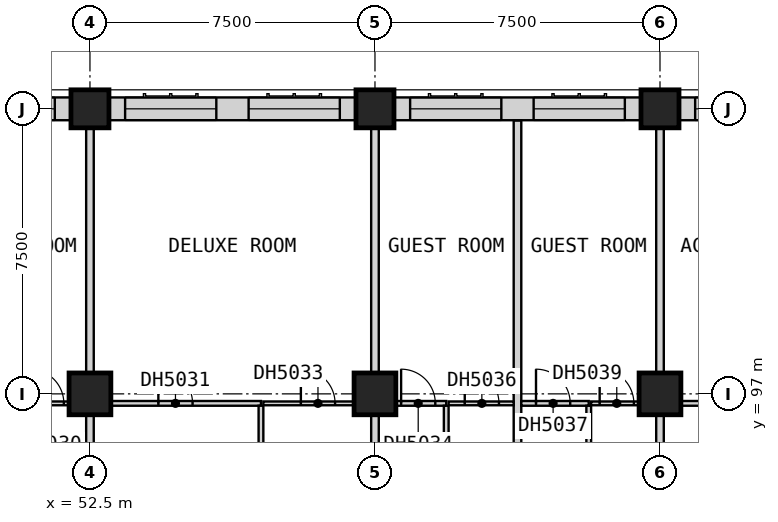
"""IFC4 building model, lengths in metres.
Left out: names, types, materials, properties, quantities, classifications, styles, units other than length and angle.
Written with IfcOpenShell. Run it as: python <this file> out.ifc"""

import sys

from ifc_helpers import new_model, si_unit, direction, frame, frame_2d, origin, origin_2d, place, context, subcontext, project, spatial, rectangle, extrude, element, fill, save


model = new_model("IFC4")
c1 = context("Model", 3, precision=1e-05, world=origin(), true_north=direction((0.0, 1.0)))
c2 = subcontext(c1, "Body", "Model", "MODEL_VIEW")
j1 = project(units=[si_unit("LENGTHUNIT", "METRE"), si_unit("PLANEANGLEUNIT", "RADIAN")], contexts=[c1])
p1 = place(None, origin())
s1 = spatial("IfcSite", under=j1, at=p1, CompositionType="ELEMENT")
p2 = place(p1, origin())
s2 = spatial("IfcBuilding", under=s1, at=p2, CompositionType="ELEMENT")
p3 = place(p2, frame((0.0, 0.0, 93.5)))
s3 = spatial("IfcBuildingStorey", under=s2, at=p3, CompositionType="ELEMENT", Elevation=93.5)
p4 = place(p3, frame((52.5, 97.0, 0.0), z_axis=(0.0, 0.0, 1.0), x_axis=(1.0, 0.0, 0.0)))
e1 = element("IfcColumn", 1, at=p4, inside=s3, PredefinedType="COLUMN", context=c2, shape_type="SweptSolid", body=[
    extrude(rectangle(XDim=1.1, YDim=1.1, at=origin_2d()), origin(), (0.0, 0.0, 1.0), 3.6),
])
p5 = place(p3, frame((52.5, 104.5, 0.0), z_axis=(0.0, 0.0, 1.0), x_axis=(1.0, 0.0, 0.0)))
e2 = element("IfcColumn", 2, at=p5, inside=s3, PredefinedType="COLUMN", context=c2, shape_type="SweptSolid", body=[
    extrude(rectangle(XDim=1.0, YDim=1.0, at=origin_2d()), origin(), (0.0, 0.0, 1.0), 3.6),
])
p6 = place(p3, frame((60.0, 97.0, 0.0), z_axis=(0.0, 0.0, 1.0), x_axis=(1.0, 0.0, 0.0)))
e3 = element("IfcColumn", 3, at=p6, inside=s3, PredefinedType="COLUMN", context=c2, shape_type="SweptSolid", body=[
    extrude(rectangle(XDim=1.1, YDim=1.1, at=origin_2d()), origin(), (0.0, 0.0, 1.0), 3.6),
])
p7 = place(p3, frame((60.0, 104.5, 0.0), z_axis=(0.0, 0.0, 1.0), x_axis=(1.0, 0.0, 0.0)))
e4 = element("IfcColumn", 4, at=p7, inside=s3, PredefinedType="COLUMN", context=c2, shape_type="SweptSolid", body=[
    extrude(rectangle(XDim=1.0, YDim=1.0, at=origin_2d()), origin(), (0.0, 0.0, 1.0), 3.6),
])
p8 = place(p3, frame((67.5, 97.0, 0.0), z_axis=(0.0, 0.0, 1.0), x_axis=(1.0, 0.0, 0.0)))
e5 = element("IfcColumn", 5, at=p8, inside=s3, PredefinedType="COLUMN", context=c2, shape_type="SweptSolid", body=[
    extrude(rectangle(XDim=1.1, YDim=1.1, at=origin_2d()), origin(), (0.0, 0.0, 1.0), 3.6),
])
p9 = place(p3, frame((67.5, 104.5, 0.0), z_axis=(0.0, 0.0, 1.0), x_axis=(1.0, 0.0, 0.0)))
e6 = element("IfcColumn", 6, at=p9, inside=s3, PredefinedType="COLUMN", context=c2, shape_type="SweptSolid", body=[
    extrude(rectangle(XDim=1.0, YDim=1.0, at=origin_2d()), origin(), (0.0, 0.0, 1.0), 3.6),
])
p10 = place(p3, frame((74.0, 104.5, 0.0), z_axis=(0.0, 0.0, 1.0), x_axis=(-1.0, 0.0, 0.0)))
e7 = element("IfcWall", 7, at=p10, inside=s3, PredefinedType="SOLIDWALL", context=c2, shape_type="SweptSolid", body=[
    extrude(rectangle(XDim=6.0, YDim=0.6, at=frame_2d((3.0, 0.0))), origin(), (0.0, 0.0, 1.0), 2.85),
])
p11 = place(p10, frame((3.175, 0.0, 0.8)))
e8 = element("IfcOpeningElement", 8, at=p11, cuts=e7, PredefinedType="OPENING", context=c2, shape_type="SweptSolid", body=[
    extrude(rectangle(XDim=2.4, YDim=1.8, at=frame_2d((1.2, 0.9))), frame((0.0, 0.31, 0.0), z_axis=(0.0, -1.0, 0.0), x_axis=(1.0, 0.0, 0.0)), (0.0, 0.0, 1.0), 0.62),
])
p12 = place(p10, frame((0.175, 0.0, 0.8)))
e9 = element("IfcOpeningElement", 9, at=p12, cuts=e7, PredefinedType="OPENING", context=c2, shape_type="SweptSolid", body=[
    extrude(rectangle(XDim=2.4, YDim=1.8, at=frame_2d((1.2, 0.9))), frame((0.0, 0.31, 0.0), z_axis=(0.0, -1.0, 0.0), x_axis=(1.0, 0.0, 0.0)), (0.0, 0.0, 1.0), 0.62),
])
p13 = place(p3, frame((67.0, 104.5, 0.0), z_axis=(0.0, 0.0, 1.0), x_axis=(-1.0, 0.0, 0.0)))
e10 = element("IfcWall", 10, at=p13, inside=s3, PredefinedType="SOLIDWALL", context=c2, shape_type="SweptSolid", body=[
    extrude(rectangle(XDim=6.5, YDim=0.6, at=frame_2d((3.25, 0.0))), origin(), (0.0, 0.0, 1.0), 2.85),
])
p14 = place(p13, frame((3.675, 0.0, 0.8)))
e11 = element("IfcOpeningElement", 11, at=p14, cuts=e10, PredefinedType="OPENING", context=c2, shape_type="SweptSolid", body=[
    extrude(rectangle(XDim=2.4, YDim=1.8, at=frame_2d((1.2, 0.9))), frame((0.0, 0.31, 0.0), z_axis=(0.0, -1.0, 0.0), x_axis=(1.0, 0.0, 0.0)), (0.0, 0.0, 1.0), 0.62),
])
p15 = place(p13, frame((0.425, 0.0, 0.8)))
e12 = element("IfcOpeningElement", 12, at=p15, cuts=e10, PredefinedType="OPENING", context=c2, shape_type="SweptSolid", body=[
    extrude(rectangle(XDim=2.4, YDim=1.8, at=frame_2d((1.2, 0.9))), frame((0.0, 0.31, 0.0), z_axis=(0.0, -1.0, 0.0), x_axis=(1.0, 0.0, 0.0)), (0.0, 0.0, 1.0), 0.62),
])
p16 = place(p3, frame((59.5, 104.5, 0.0), z_axis=(0.0, 0.0, 1.0), x_axis=(-1.0, 0.0, 0.0)))
e13 = element("IfcWall", 13, at=p16, inside=s3, PredefinedType="SOLIDWALL", context=c2, shape_type="SweptSolid", body=[
    extrude(rectangle(XDim=6.5, YDim=0.6, at=frame_2d((3.25, 0.0))), origin(), (0.0, 0.0, 1.0), 2.85),
])
p17 = place(p16, frame((3.675, 0.0, 0.8)))
e14 = element("IfcOpeningElement", 14, at=p17, cuts=e13, PredefinedType="OPENING", context=c2, shape_type="SweptSolid", body=[
    extrude(rectangle(XDim=2.4, YDim=1.8, at=frame_2d((1.2, 0.9))), frame((0.0, 0.31, 0.0), z_axis=(0.0, -1.0, 0.0), x_axis=(1.0, 0.0, 0.0)), (0.0, 0.0, 1.0), 0.62),
])
p18 = place(p16, frame((0.425, 0.0, 0.8)))
e15 = element("IfcOpeningElement", 15, at=p18, cuts=e13, PredefinedType="OPENING", context=c2, shape_type="SweptSolid", body=[
    extrude(rectangle(XDim=2.4, YDim=1.8, at=frame_2d((1.2, 0.9))), frame((0.0, 0.31, 0.0), z_axis=(0.0, -1.0, 0.0), x_axis=(1.0, 0.0, 0.0)), (0.0, 0.0, 1.0), 0.62),
])
p19 = place(p3, frame((52.0, 104.5, 0.0), z_axis=(0.0, 0.0, 1.0), x_axis=(-1.0, 0.0, 0.0)))
e16 = element("IfcWall", 16, at=p19, inside=s3, PredefinedType="SOLIDWALL", context=c2, shape_type="SweptSolid", body=[
    extrude(rectangle(XDim=6.5, YDim=0.6, at=frame_2d((3.25, 0.0))), origin(), (0.0, 0.0, 1.0), 2.85),
])
p20 = place(p19, frame((3.675, 0.0, 0.8)))
e17 = element("IfcOpeningElement", 17, at=p20, cuts=e16, PredefinedType="OPENING", context=c2, shape_type="SweptSolid", body=[
    extrude(rectangle(XDim=2.4, YDim=1.8, at=frame_2d((1.2, 0.9))), frame((0.0, 0.31, 0.0), z_axis=(0.0, -1.0, 0.0), x_axis=(1.0, 0.0, 0.0)), (0.0, 0.0, 1.0), 0.62),
])
p21 = place(p19, frame((0.425, 0.0, 0.8)))
e18 = element("IfcOpeningElement", 18, at=p21, cuts=e16, PredefinedType="OPENING", context=c2, shape_type="SweptSolid", body=[
    extrude(rectangle(XDim=2.4, YDim=1.8, at=frame_2d((1.2, 0.9))), frame((0.0, 0.31, 0.0), z_axis=(0.0, -1.0, 0.0), x_axis=(1.0, 0.0, 0.0)), (0.0, 0.0, 1.0), 0.62),
])
for number, where, z_axis, x_axis in (
    (19, (52.5, 92.475, 0.0), (0.0, 0.0, 1.0), (0.0, 1.0, 0.0)),
    (20, (60.0, 92.475, 0.0), (0.0, 0.0, 1.0), (0.0, 1.0, 0.0)),
):
    element("IfcWall", number, at=place(p3, frame(where, z_axis=z_axis, x_axis=x_axis)), inside=s3, PredefinedType="PARTITIONING", context=c2, shape_type="SweptSolid", body=[
        extrude(rectangle(XDim=12.525, YDim=0.2, at=frame_2d((6.262, 0.0))), origin(), (0.0, 0.0, 1.0), 3.35),
    ])
p22 = place(p3, frame((63.75, 92.475, 0.0), z_axis=(0.0, 0.0, 1.0), x_axis=(0.0, 1.0, 0.0)))
e21 = element("IfcWall", 21, at=p22, inside=s3, PredefinedType="PARTITIONING", context=c2, shape_type="SweptSolid", body=[
    extrude(rectangle(XDim=11.715, YDim=0.2, at=frame_2d((5.857, 0.0))), origin(), (0.0, 0.0, 1.0), 3.35),
])
p23 = place(p3, frame((67.5, 92.475, 0.0), z_axis=(0.0, 0.0, 1.0), x_axis=(0.0, 1.0, 0.0)))
e22 = element("IfcWall", 22, at=p23, inside=s3, PredefinedType="PARTITIONING", context=c2, shape_type="SweptSolid", body=[
    extrude(rectangle(XDim=12.525, YDim=0.2, at=frame_2d((6.262, 0.0))), origin(), (0.0, 0.0, 1.0), 3.35),
])
p24 = place(p3, frame((50.688, 96.75, 0.0), z_axis=(0.0, 0.0, 1.0), x_axis=(1.0, 0.0, 0.0)))
e23 = element("IfcWall", 23, at=p24, inside=s3, PredefinedType="PARTITIONING", context=c2, shape_type="SweptSolid", body=[
    extrude(rectangle(XDim=1.712, YDim=0.1, at=frame_2d((0.856, 0.0))), origin(), (0.0, 0.0, 1.0), 3.35),
])
p25 = place(p24, frame((0.225, 0.0, 0.0)))
e24 = element("IfcOpeningElement", 24, at=p25, cuts=e23, PredefinedType="OPENING", context=c2, shape_type="SweptSolid", body=[
    extrude(rectangle(XDim=0.9, YDim=2.1, at=frame_2d((0.45, 1.05))), frame((0.0, 0.06, 0.0), z_axis=(0.0, -1.0, 0.0), x_axis=(1.0, 0.0, 0.0)), (0.0, 0.0, 1.0), 0.12),
])
p26 = place(p3, frame((57.062, 96.75, 0.0), z_axis=(0.0, 0.0, 1.0), x_axis=(1.0, 0.0, 0.0)))
e25 = element("IfcWall", 25, at=p26, inside=s3, PredefinedType="PARTITIONING", context=c2, shape_type="SweptSolid", body=[
    extrude(rectangle(XDim=2.837, YDim=0.1, at=frame_2d((1.419, 0.0))), origin(), (0.0, 0.0, 1.0), 3.35),
])
p27 = place(p26, frame((0.988, 0.0, 0.0)))
e26 = element("IfcOpeningElement", 26, at=p27, cuts=e25, PredefinedType="OPENING", context=c2, shape_type="SweptSolid", body=[
    extrude(rectangle(XDim=0.9, YDim=2.1, at=frame_2d((0.45, 1.05))), frame((0.0, 0.06, 0.0), z_axis=(0.0, -1.0, 0.0), x_axis=(1.0, 0.0, 0.0)), (0.0, 0.0, 1.0), 0.12),
])
p28 = place(p3, frame((61.938, 96.75, 0.0), z_axis=(0.0, 0.0, 1.0), x_axis=(1.0, 0.0, 0.0)))
e27 = element("IfcWall", 27, at=p28, inside=s3, PredefinedType="PARTITIONING", context=c2, shape_type="SweptSolid", body=[
    extrude(rectangle(XDim=1.712, YDim=0.1, at=frame_2d((0.856, 0.0))), origin(), (0.0, 0.0, 1.0), 3.35),
])
p29 = place(p28, frame((0.425, 0.0, 0.0)))
e28 = element("IfcOpeningElement", 28, at=p29, cuts=e27, PredefinedType="OPENING", context=c2, shape_type="SweptSolid", body=[
    extrude(rectangle(XDim=0.9, YDim=2.1, at=frame_2d((0.45, 1.05))), frame((0.0, 0.06, 0.0), z_axis=(0.0, -1.0, 0.0), x_axis=(1.0, 0.0, 0.0)), (0.0, 0.0, 1.0), 0.12),
])
p30 = place(p3, frame((65.688, 96.75, 0.0), z_axis=(0.0, 0.0, 1.0), x_axis=(1.0, 0.0, 0.0)))
e29 = element("IfcWall", 29, at=p30, inside=s3, PredefinedType="PARTITIONING", context=c2, shape_type="SweptSolid", body=[
    extrude(rectangle(XDim=1.712, YDim=0.1, at=frame_2d((0.856, 0.0))), origin(), (0.0, 0.0, 1.0), 3.35),
])
p31 = place(p30, frame((0.225, 0.0, 0.0)))
e30 = element("IfcOpeningElement", 30, at=p31, cuts=e29, PredefinedType="OPENING", context=c2, shape_type="SweptSolid", body=[
    extrude(rectangle(XDim=0.9, YDim=2.1, at=frame_2d((0.45, 1.05))), frame((0.0, 0.06, 0.0), z_axis=(0.0, -1.0, 0.0), x_axis=(1.0, 0.0, 0.0)), (0.0, 0.0, 1.0), 0.12),
])
p32 = place(p3, frame((52.6, 96.75, 0.0), z_axis=(0.0, 0.0, 1.0), x_axis=(1.0, 0.0, 0.0)))
e31 = element("IfcWall", 31, at=p32, inside=s3, PredefinedType="PARTITIONING", context=c2, shape_type="SweptSolid", body=[
    extrude(rectangle(XDim=4.4, YDim=0.125, at=frame_2d((2.2, 0.0))), origin(), (0.0, 0.0, 1.0), 3.35),
])
p33 = place(p32, frame((1.7, 0.0, 0.0)))
e32 = element("IfcOpeningElement", 32, at=p33, cuts=e31, PredefinedType="OPENING", context=c2, shape_type="SweptSolid", body=[
    extrude(rectangle(XDim=0.9, YDim=2.1, at=frame_2d((0.45, 1.05))), frame((0.0, 0.073, 0.0), z_axis=(0.0, -1.0, 0.0), x_axis=(1.0, 0.0, 0.0)), (0.0, 0.0, 1.0), 0.145),
])
p34 = place(p3, frame((60.1, 96.75, 0.0), z_axis=(0.0, 0.0, 1.0), x_axis=(1.0, 0.0, 0.0)))
e33 = element("IfcWall", 33, at=p34, inside=s3, PredefinedType="PARTITIONING", context=c2, shape_type="SweptSolid", body=[
    extrude(rectangle(XDim=1.775, YDim=0.125, at=frame_2d((0.887, 0.0))), origin(), (0.0, 0.0, 1.0), 3.35),
])
p35 = place(p34, frame((0.587, 0.0, 0.0)))
e34 = element("IfcOpeningElement", 34, at=p35, cuts=e33, PredefinedType="OPENING", context=c2, shape_type="SweptSolid", body=[
    extrude(rectangle(XDim=0.9, YDim=2.1, at=frame_2d((0.45, 1.05))), frame((0.0, 0.073, 0.0), z_axis=(0.0, -1.0, 0.0), x_axis=(1.0, 0.0, 0.0)), (0.0, 0.0, 1.0), 0.145),
])
p36 = place(p3, frame((63.85, 96.75, 0.0), z_axis=(0.0, 0.0, 1.0), x_axis=(1.0, 0.0, 0.0)))
e35 = element("IfcWall", 35, at=p36, inside=s3, PredefinedType="PARTITIONING", context=c2, shape_type="SweptSolid", body=[
    extrude(rectangle(XDim=1.775, YDim=0.125, at=frame_2d((0.887, 0.0))), origin(), (0.0, 0.0, 1.0), 3.35),
])
p37 = place(p36, frame((0.387, 0.0, 0.0)))
e36 = element("IfcOpeningElement", 36, at=p37, cuts=e35, PredefinedType="OPENING", context=c2, shape_type="SweptSolid", body=[
    extrude(rectangle(XDim=0.9, YDim=2.1, at=frame_2d((0.45, 1.05))), frame((0.0, 0.073, 0.0), z_axis=(0.0, -1.0, 0.0), x_axis=(1.0, 0.0, 0.0)), (0.0, 0.0, 1.0), 0.145),
])
p38 = place(p3, frame((67.6, 96.75, 0.0), z_axis=(0.0, 0.0, 1.0), x_axis=(1.0, 0.0, 0.0)))
e37 = element("IfcWall", 37, at=p38, inside=s3, PredefinedType="PARTITIONING", context=c2, shape_type="SweptSolid", body=[
    extrude(rectangle(XDim=4.775, YDim=0.125, at=frame_2d((2.387, 0.0))), origin(), (0.0, 0.0, 1.0), 3.35),
])
p39 = place(p38, frame((1.837, 0.0, 0.0)))
e38 = element("IfcOpeningElement", 38, at=p39, cuts=e37, PredefinedType="OPENING", context=c2, shape_type="SweptSolid", body=[
    extrude(rectangle(XDim=1.0, YDim=2.1, at=frame_2d((0.5, 1.05))), frame((0.0, 0.073, 0.0), z_axis=(0.0, -1.0, 0.0), x_axis=(1.0, 0.0, 0.0)), (0.0, 0.0, 1.0), 0.145),
])
for number, where, z_axis, x_axis in (
    (39, (57.0, 92.475, 0.0), (0.0, 0.0, 1.0), (0.0, 1.0, 0.0)),
    (40, (61.875, 92.475, 0.0), (0.0, 0.0, 1.0), (0.0, 1.0, 0.0)),
    (41, (65.625, 92.475, 0.0), (0.0, 0.0, 1.0), (0.0, 1.0, 0.0)),
):
    element("IfcWall", number, at=place(p3, frame(where, z_axis=z_axis, x_axis=x_axis)), inside=s3, PredefinedType="PARTITIONING", context=c2, shape_type="SweptSolid", body=[
        extrude(rectangle(XDim=4.212, YDim=0.125, at=frame_2d((2.106, 0.0))), origin(), (0.0, 0.0, 1.0), 3.35),
    ])
p40 = place(p11, origin())
e42 = element("IfcWindow", 42, at=p40, inside=s3, PartitioningType="SINGLE_PANEL", PredefinedType="WINDOW", context=c2, shape_type="SweptSolid", body=[
    extrude(rectangle(XDim=2.4, YDim=1.8, at=frame_2d((1.2, 0.9))), frame((0.0, -0.07, 0.0), z_axis=(0.0, -1.0, 0.0), x_axis=(1.0, 0.0, 0.0)), (0.0, 0.0, 1.0), 0.06),
])
fill(e8, e42)
p41 = place(p14, origin())
e43 = element("IfcWindow", 43, at=p41, inside=s3, PartitioningType="SINGLE_PANEL", PredefinedType="WINDOW", context=c2, shape_type="SweptSolid", body=[
    extrude(rectangle(XDim=2.4, YDim=1.8, at=frame_2d((1.2, 0.9))), frame((0.0, -0.07, 0.0), z_axis=(0.0, -1.0, 0.0), x_axis=(1.0, 0.0, 0.0)), (0.0, 0.0, 1.0), 0.06),
])
fill(e11, e43)
p42 = place(p15, origin())
e44 = element("IfcWindow", 44, at=p42, inside=s3, PartitioningType="SINGLE_PANEL", PredefinedType="WINDOW", context=c2, shape_type="SweptSolid", body=[
    extrude(rectangle(XDim=2.4, YDim=1.8, at=frame_2d((1.2, 0.9))), frame((0.0, -0.07, 0.0), z_axis=(0.0, -1.0, 0.0), x_axis=(1.0, 0.0, 0.0)), (0.0, 0.0, 1.0), 0.06),
])
fill(e12, e44)
p43 = place(p17, origin())
e45 = element("IfcWindow", 45, at=p43, inside=s3, PartitioningType="SINGLE_PANEL", PredefinedType="WINDOW", context=c2, shape_type="SweptSolid", body=[
    extrude(rectangle(XDim=2.4, YDim=1.8, at=frame_2d((1.2, 0.9))), frame((0.0, -0.07, 0.0), z_axis=(0.0, -1.0, 0.0), x_axis=(1.0, 0.0, 0.0)), (0.0, 0.0, 1.0), 0.06),
])
fill(e14, e45)
p44 = place(p18, origin())
e46 = element("IfcWindow", 46, at=p44, inside=s3, PartitioningType="SINGLE_PANEL", PredefinedType="WINDOW", context=c2, shape_type="SweptSolid", body=[
    extrude(rectangle(XDim=2.4, YDim=1.8, at=frame_2d((1.2, 0.9))), frame((0.0, -0.07, 0.0), z_axis=(0.0, -1.0, 0.0), x_axis=(1.0, 0.0, 0.0)), (0.0, 0.0, 1.0), 0.06),
])
fill(e15, e46)
p45 = place(p21, origin())
e47 = element("IfcWindow", 47, at=p45, inside=s3, PartitioningType="SINGLE_PANEL", PredefinedType="WINDOW", context=c2, shape_type="SweptSolid", body=[
    extrude(rectangle(XDim=2.4, YDim=1.8, at=frame_2d((1.2, 0.9))), frame((0.0, -0.07, 0.0), z_axis=(0.0, -1.0, 0.0), x_axis=(1.0, 0.0, 0.0)), (0.0, 0.0, 1.0), 0.06),
])
fill(e18, e47)
p46 = place(p25, origin())
e48 = element("IfcDoor", 48, at=p46, inside=s3, OperationType="SINGLE_SWING_RIGHT", PredefinedType="DOOR", context=c2, shape_type="SweptSolid", body=[
    extrude(rectangle(XDim=0.9, YDim=2.1, at=frame_2d((0.45, 1.05))), frame((0.0, 0.025, 0.0), z_axis=(0.0, -1.0, 0.0), x_axis=(1.0, 0.0, 0.0)), (0.0, 0.0, 1.0), 0.05),
])
fill(e24, e48)
p47 = place(p33, origin())
e49 = element("IfcDoor", 49, at=p47, inside=s3, OperationType="SINGLE_SWING_RIGHT", PredefinedType="DOOR", context=c2, shape_type="SweptSolid", body=[
    extrude(rectangle(XDim=0.9, YDim=2.1, at=frame_2d((0.45, 1.05))), frame((0.0, 0.025, 0.0), z_axis=(0.0, -1.0, 0.0), x_axis=(1.0, 0.0, 0.0)), (0.0, 0.0, 1.0), 0.05),
])
fill(e32, e49)
p48 = place(p27, origin())
e50 = element("IfcDoor", 50, at=p48, inside=s3, OperationType="SINGLE_SWING_RIGHT", PredefinedType="DOOR", context=c2, shape_type="SweptSolid", body=[
    extrude(rectangle(XDim=0.9, YDim=2.1, at=frame_2d((0.45, 1.05))), frame((0.0, 0.025, 0.0), z_axis=(0.0, -1.0, 0.0), x_axis=(1.0, 0.0, 0.0)), (0.0, 0.0, 1.0), 0.05),
])
fill(e26, e50)
p49 = place(p35, origin())
e51 = element("IfcDoor", 51, at=p49, inside=s3, OperationType="SINGLE_SWING_LEFT", PredefinedType="DOOR", context=c2, shape_type="SweptSolid", body=[
    extrude(rectangle(XDim=0.9, YDim=2.1, at=frame_2d((0.45, 1.05))), frame((0.0, 0.025, 0.0), z_axis=(0.0, -1.0, 0.0), x_axis=(1.0, 0.0, 0.0)), (0.0, 0.0, 1.0), 0.05),
])
fill(e34, e51)
p50 = place(p29, origin())
e52 = element("IfcDoor", 52, at=p50, inside=s3, OperationType="SINGLE_SWING_RIGHT", PredefinedType="DOOR", context=c2, shape_type="SweptSolid", body=[
    extrude(rectangle(XDim=0.9, YDim=2.1, at=frame_2d((0.45, 1.05))), frame((0.0, 0.025, 0.0), z_axis=(0.0, -1.0, 0.0), x_axis=(1.0, 0.0, 0.0)), (0.0, 0.0, 1.0), 0.05),
])
fill(e28, e52)
p51 = place(p37, origin())
e53 = element("IfcDoor", 53, at=p51, inside=s3, OperationType="SINGLE_SWING_RIGHT", PredefinedType="DOOR", context=c2, shape_type="SweptSolid", body=[
    extrude(rectangle(XDim=0.9, YDim=2.1, at=frame_2d((0.45, 1.05))), frame((0.0, 0.025, 0.0), z_axis=(0.0, -1.0, 0.0), x_axis=(1.0, 0.0, 0.0)), (0.0, 0.0, 1.0), 0.05),
])
fill(e36, e53)
p52 = place(p31, origin())
e54 = element("IfcDoor", 54, at=p52, inside=s3, OperationType="SINGLE_SWING_RIGHT", PredefinedType="DOOR", context=c2, shape_type="SweptSolid", body=[
    extrude(rectangle(XDim=0.9, YDim=2.1, at=frame_2d((0.45, 1.05))), frame((0.0, 0.025, 0.0), z_axis=(0.0, -1.0, 0.0), x_axis=(1.0, 0.0, 0.0)), (0.0, 0.0, 1.0), 0.05),
])
fill(e30, e54)
save(model, sys.argv[1])
